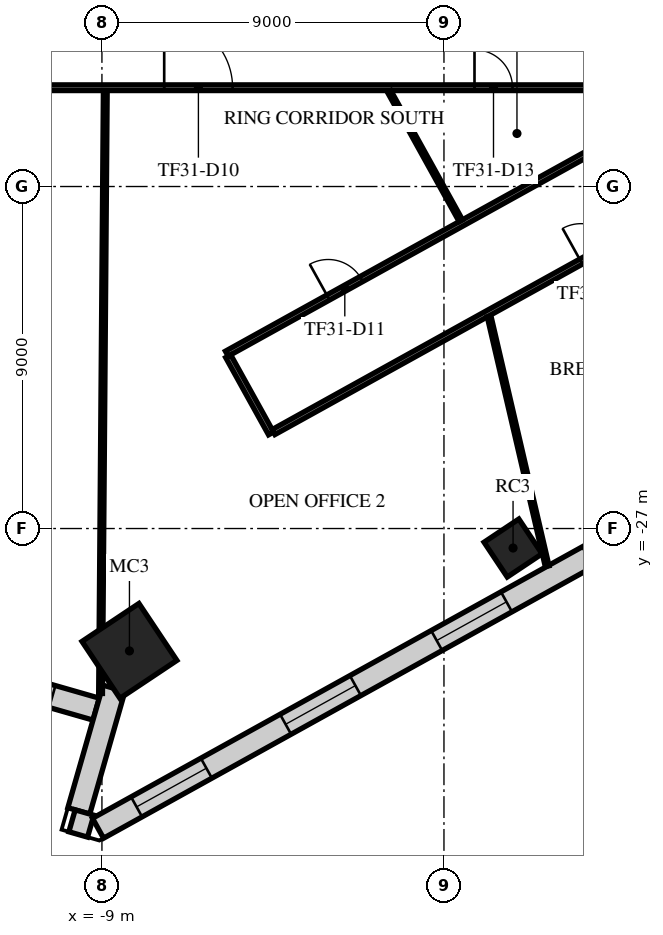
"""IFC4 building model, lengths in metres.
Left out: names, types, materials, properties, quantities, classifications, styles, units other than length and angle.
Written with IfcOpenShell. Run it as: python <this file> out.ifc"""

import sys

from ifc_helpers import new_model, si_unit, direction, frame, frame_2d, origin, origin_2d, place, context, subcontext, project, spatial, rectangle, extrude, element, fill, save


model = new_model("IFC4")
c1 = context("Model", 3, precision=1e-05, world=origin(), true_north=direction((0.0, 1.0)))
c2 = subcontext(c1, "Body", "Model", "MODEL_VIEW")
j1 = project(units=[si_unit("LENGTHUNIT", "METRE"), si_unit("PLANEANGLEUNIT", "RADIAN")], contexts=[c1])
p1 = place(None, origin())
s1 = spatial("IfcSite", under=j1, at=p1, CompositionType="ELEMENT")
p2 = place(p1, origin())
s2 = spatial("IfcBuilding", under=s1, at=p2, CompositionType="ELEMENT")
p3 = place(p2, frame((0.0, 0.0, 139.7)))
s3 = spatial("IfcBuildingStorey", under=s2, at=p3, CompositionType="ELEMENT", Elevation=139.7)
p4 = place(p3, frame((-8.276, -30.221, 0.0), z_axis=(0.0, 0.0, 1.0), x_axis=(0.832028680356, 0.55473261583, 0.0)))
e1 = element("IfcColumn", 1, at=p4, inside=s3, PredefinedType="COLUMN", context=c2, shape_type="SweptSolid", body=[
    extrude(rectangle(XDim=1.8, YDim=1.8, at=origin_2d()), origin(), (0.0, 0.0, 1.0), 4.0),
])
p5 = place(p3, frame((1.818, -27.513, 0.0), z_axis=(0.0, 0.0, 1.0), x_axis=(0.832028680356, 0.55473261583, 0.0)))
e2 = element("IfcColumn", 2, at=p5, inside=s3, PredefinedType="COLUMN", context=c2, shape_type="SweptSolid", body=[
    extrude(rectangle(XDim=1.1, YDim=1.1, at=origin_2d()), origin(), (0.0, 0.0, 1.0), 4.0),
])
p6 = place(p3, frame((-13.958, -30.375, 0.0), z_axis=(0.0, 0.0, 1.0), x_axis=(0.961260009649, -0.275643236537, 0.0)))
e3 = element("IfcWall", 3, at=p6, inside=s3, PredefinedType="STANDARD", context=c2, shape_type="SweptSolid", body=[
    extrude(rectangle(XDim=5.0, YDim=0.6, at=frame_2d((2.5, 0.0))), origin(), (0.0, 0.0, 1.0), 3.6),
])
p7 = place(p6, frame((1.2, 0.0, 0.9)))
e4 = element("IfcOpeningElement", 4, at=p7, cuts=e3, PredefinedType="OPENING", context=c2, shape_type="SweptSolid", body=[
    extrude(rectangle(XDim=2.6, YDim=2.1, at=frame_2d((1.3, 1.05))), frame((0.0, 0.31, 0.0), z_axis=(0.0, -1.0, 0.0), x_axis=(1.0, 0.0, 0.0)), (0.0, 0.0, 1.0), 0.62),
])
p8 = place(p3, frame((-8.683, -31.205, 0.0), z_axis=(0.0, 0.0, 1.0), x_axis=(-0.275672311862, -0.961251671766, 0.0)))
e5 = element("IfcWall", 5, at=p8, inside=s3, PredefinedType="STANDARD", context=c2, shape_type="SweptSolid", body=[
    extrude(rectangle(XDim=3.356, YDim=0.6, at=frame_2d((1.678, 0.0))), origin(), (0.0, 0.0, 1.0), 3.6),
])
p9 = place(p3, frame((-9.787, -34.691, 0.0), z_axis=(0.0, 0.0, 1.0), x_axis=(0.96119910246, -0.275855551749, 0.0)))
e6 = element("IfcWall", 6, at=p9, inside=s3, PredefinedType="STANDARD", context=c2, shape_type="SweptSolid", body=[
    extrude(rectangle(XDim=0.511, YDim=0.6, at=frame_2d((0.256, 0.0))), origin(), (0.0, 0.0, 1.0), 3.6),
])
p10 = place(p3, frame((-9.103, -34.888, 0.0), z_axis=(0.0, 0.0, 1.0), x_axis=(0.874618897425, 0.484811081007, 0.0)))
e7 = element("IfcWall", 7, at=p10, inside=s3, PredefinedType="STANDARD", context=c2, shape_type="SweptSolid", body=[
    extrude(rectangle(XDim=49.751, YDim=0.6, at=frame_2d((24.876, 0.0))), origin(), (0.0, 0.0, 1.0), 3.6),
])
p11 = place(p10, frame((1.161, 0.0, 0.9)))
e8 = element("IfcOpeningElement", 8, at=p11, cuts=e7, PredefinedType="OPENING", context=c2, shape_type="SweptSolid", body=[
    extrude(rectangle(XDim=2.1, YDim=2.1, at=frame_2d((1.05, 1.05))), frame((0.0, 0.31, 0.0), z_axis=(0.0, -1.0, 0.0), x_axis=(1.0, 0.0, 0.0)), (0.0, 0.0, 1.0), 0.62),
])
p12 = place(p10, frame((5.644, 0.0, 0.9)))
e9 = element("IfcOpeningElement", 9, at=p12, cuts=e7, PredefinedType="OPENING", context=c2, shape_type="SweptSolid", body=[
    extrude(rectangle(XDim=2.1, YDim=2.1, at=frame_2d((1.05, 1.05))), frame((0.0, 0.31, 0.0), z_axis=(0.0, -1.0, 0.0), x_axis=(1.0, 0.0, 0.0)), (0.0, 0.0, 1.0), 0.62),
])
p13 = place(p10, frame((10.189, 0.0, 0.9)))
e10 = element("IfcOpeningElement", 10, at=p13, cuts=e7, PredefinedType="OPENING", context=c2, shape_type="SweptSolid", body=[
    extrude(rectangle(XDim=2.1, YDim=2.1, at=frame_2d((1.05, 1.05))), frame((0.0, 0.31, 0.0), z_axis=(0.0, -1.0, 0.0), x_axis=(1.0, 0.0, 0.0)), (0.0, 0.0, 1.0), 0.62),
])
p14 = place(p10, frame((14.735, 0.0, 0.9)))
e11 = element("IfcOpeningElement", 11, at=p14, cuts=e7, PredefinedType="OPENING", context=c2, shape_type="SweptSolid", body=[
    extrude(rectangle(XDim=2.1, YDim=2.1, at=frame_2d((1.05, 1.05))), frame((0.0, 0.31, 0.0), z_axis=(0.0, -1.0, 0.0), x_axis=(1.0, 0.0, 0.0)), (0.0, 0.0, 1.0), 0.62),
])
p15 = place(p10, frame((19.28, 0.0, 0.9)))
e12 = element("IfcOpeningElement", 12, at=p15, cuts=e7, PredefinedType="OPENING", context=c2, shape_type="SweptSolid", body=[
    extrude(rectangle(XDim=2.1, YDim=2.1, at=frame_2d((1.05, 1.05))), frame((0.0, 0.31, 0.0), z_axis=(0.0, -1.0, 0.0), x_axis=(1.0, 0.0, 0.0)), (0.0, 0.0, 1.0), 0.62),
])
p16 = place(p10, frame((23.826, 0.0, 0.9)))
e13 = element("IfcOpeningElement", 13, at=p16, cuts=e7, PredefinedType="OPENING", context=c2, shape_type="SweptSolid", body=[
    extrude(rectangle(XDim=2.1, YDim=2.1, at=frame_2d((1.05, 1.05))), frame((0.0, 0.31, 0.0), z_axis=(0.0, -1.0, 0.0), x_axis=(1.0, 0.0, 0.0)), (0.0, 0.0, 1.0), 0.62),
])
p17 = place(p10, frame((28.371, 0.0, 0.9)))
e14 = element("IfcOpeningElement", 14, at=p17, cuts=e7, PredefinedType="OPENING", context=c2, shape_type="SweptSolid", body=[
    extrude(rectangle(XDim=2.1, YDim=2.1, at=frame_2d((1.05, 1.05))), frame((0.0, 0.31, 0.0), z_axis=(0.0, -1.0, 0.0), x_axis=(1.0, 0.0, 0.0)), (0.0, 0.0, 1.0), 0.62),
])
p18 = place(p10, frame((32.917, 0.0, 0.9)))
e15 = element("IfcOpeningElement", 15, at=p18, cuts=e7, PredefinedType="OPENING", context=c2, shape_type="SweptSolid", body=[
    extrude(rectangle(XDim=2.1, YDim=2.1, at=frame_2d((1.05, 1.05))), frame((0.0, 0.31, 0.0), z_axis=(0.0, -1.0, 0.0), x_axis=(1.0, 0.0, 0.0)), (0.0, 0.0, 1.0), 0.62),
])
p19 = place(p10, frame((37.462, 0.0, 0.9)))
e16 = element("IfcOpeningElement", 16, at=p19, cuts=e7, PredefinedType="OPENING", context=c2, shape_type="SweptSolid", body=[
    extrude(rectangle(XDim=2.1, YDim=2.1, at=frame_2d((1.05, 1.05))), frame((0.0, 0.31, 0.0), z_axis=(0.0, -1.0, 0.0), x_axis=(1.0, 0.0, 0.0)), (0.0, 0.0, 1.0), 0.62),
])
p20 = place(p10, frame((42.008, 0.0, 0.9)))
e17 = element("IfcOpeningElement", 17, at=p20, cuts=e7, PredefinedType="OPENING", context=c2, shape_type="SweptSolid", body=[
    extrude(rectangle(XDim=2.1, YDim=2.1, at=frame_2d((1.05, 1.05))), frame((0.0, 0.31, 0.0), z_axis=(0.0, -1.0, 0.0), x_axis=(1.0, 0.0, 0.0)), (0.0, 0.0, 1.0), 0.62),
])
p21 = place(p10, frame((46.491, 0.0, 0.9)))
e18 = element("IfcOpeningElement", 18, at=p21, cuts=e7, PredefinedType="OPENING", context=c2, shape_type="SweptSolid", body=[
    extrude(rectangle(XDim=2.1, YDim=2.1, at=frame_2d((1.05, 1.05))), frame((0.0, 0.31, 0.0), z_axis=(0.0, -1.0, 0.0), x_axis=(1.0, 0.0, 0.0)), (0.0, 0.0, 1.0), 0.62),
])
p22 = place(p3, frame((-14.684, -15.4, 0.0), z_axis=(0.0, 0.0, 1.0), x_axis=(1.0, 0.0, 0.0)))
e19 = element("IfcWall", 19, at=p22, inside=s3, PredefinedType="PARTITIONING", context=c2, shape_type="SweptSolid", body=[
    extrude(rectangle(XDim=21.596, YDim=0.15, at=frame_2d((10.798, 0.0))), origin(), (0.0, 0.0, 1.0), 3.15),
])
p23 = place(p22, frame((7.322, 0.0, 0.0)))
e20 = element("IfcOpeningElement", 20, at=p23, cuts=e19, PredefinedType="OPENING", context=c2, shape_type="SweptSolid", body=[
    extrude(rectangle(XDim=1.8, YDim=2.1, at=frame_2d((0.9, 1.05))), frame((0.0, 0.085, 0.0), z_axis=(0.0, -1.0, 0.0), x_axis=(1.0, 0.0, 0.0)), (0.0, 0.0, 1.0), 0.17),
])
p24 = place(p22, frame((15.487, 0.0, 0.0)))
e21 = element("IfcOpeningElement", 21, at=p24, cuts=e19, PredefinedType="OPENING", context=c2, shape_type="SweptSolid", body=[
    extrude(rectangle(XDim=1.0, YDim=2.1, at=frame_2d((0.5, 1.05))), frame((0.0, 0.085, 0.0), z_axis=(0.0, -1.0, 0.0), x_axis=(1.0, 0.0, 0.0)), (0.0, 0.0, 1.0), 0.17),
])
p25 = place(p3, frame((-5.714, -22.399, 0.0), z_axis=(0.0, 0.0, 1.0), x_axis=(0.874614395079, 0.484819203334, 0.0)))
e22 = element("IfcWall", 22, at=p25, inside=s3, PredefinedType="PARTITIONING", context=c2, shape_type="SweptSolid", body=[
    extrude(rectangle(XDim=14.146, YDim=0.15, at=frame_2d((7.073, 0.0))), origin(), (0.0, 0.0, 1.0), 3.15),
])
p26 = place(p25, frame((3.05, 0.0, 0.0)))
e23 = element("IfcOpeningElement", 23, at=p26, cuts=e22, PredefinedType="OPENING", context=c2, shape_type="SweptSolid", body=[
    extrude(rectangle(XDim=1.0, YDim=2.1, at=frame_2d((0.5, 1.05))), frame((0.0, 0.085, 0.0), z_axis=(0.0, -1.0, 0.0), x_axis=(1.0, 0.0, 0.0)), (0.0, 0.0, 1.0), 0.17),
])
p27 = place(p3, frame((-5.677, -22.465, 0.0), z_axis=(0.0, 0.0, 1.0), x_axis=(0.484902784843, -0.874568058673, 0.0)))
e24 = element("IfcWall", 24, at=p27, inside=s3, PredefinedType="PARTITIONING", context=c2, shape_type="SweptSolid", body=[
    extrude(rectangle(XDim=2.325, YDim=0.15, at=frame_2d((1.163, 0.0))), origin(), (0.0, 0.0, 1.0), 3.6),
])
p28 = place(p3, frame((-4.484, -24.462, 0.0), z_axis=(0.0, 0.0, 1.0), x_axis=(0.874618059696, 0.484812592301, 0.0)))
e25 = element("IfcWall", 25, at=p28, inside=s3, PredefinedType="PARTITIONING", context=c2, shape_type="SweptSolid", body=[
    extrude(rectangle(XDim=31.638, YDim=0.15, at=frame_2d((15.819, 0.0))), origin(), (0.0, 0.0, 1.0), 3.15),
])
p29 = place(p28, frame((9.25, 0.0, 0.0)))
e26 = element("IfcOpeningElement", 26, at=p29, cuts=e25, PredefinedType="OPENING", context=c2, shape_type="SweptSolid", body=[
    extrude(rectangle(XDim=1.0, YDim=2.1, at=frame_2d((0.5, 1.05))), frame((0.0, 0.085, 0.0), z_axis=(0.0, -1.0, 0.0), x_axis=(1.0, 0.0, 0.0)), (0.0, 0.0, 1.0), 0.17),
])
p30 = place(p28, frame((19.239, 0.0, 0.0)))
e27 = element("IfcOpeningElement", 27, at=p30, cuts=e25, PredefinedType="OPENING", context=c2, shape_type="SweptSolid", body=[
    extrude(rectangle(XDim=1.0, YDim=2.1, at=frame_2d((0.5, 1.05))), frame((0.0, 0.085, 0.0), z_axis=(0.0, -1.0, 0.0), x_axis=(1.0, 0.0, 0.0)), (0.0, 0.0, 1.0), 0.17),
])
p31 = place(p28, frame((24.772, 0.0, 0.0)))
e28 = element("IfcOpeningElement", 28, at=p31, cuts=e25, PredefinedType="OPENING", context=c2, shape_type="SweptSolid", body=[
    extrude(rectangle(XDim=1.0, YDim=2.1, at=frame_2d((0.5, 1.05))), frame((0.0, 0.085, 0.0), z_axis=(0.0, -1.0, 0.0), x_axis=(1.0, 0.0, 0.0)), (0.0, 0.0, 1.0), 0.17),
])
p32 = place(p3, frame((-9.036, -31.34, 0.0), z_axis=(0.0, 0.0, 1.0), x_axis=(0.008145579251, 0.999966824219, 0.0)))
e29 = element("IfcWall", 29, at=p32, inside=s3, PredefinedType="PARTITIONING", context=c2, shape_type="SweptSolid", body=[
    extrude(rectangle(XDim=0.629, YDim=0.1, at=frame_2d((0.315, 0.0))), origin(), (0.0, 0.0, 1.0), 3.6),
])
p33 = place(p3, frame((-9.023, -29.637, 0.0), z_axis=(0.0, 0.0, 1.0), x_axis=(0.007843639619, 0.999969238186, 0.0)))
e30 = element("IfcWall", 30, at=p33, inside=s3, PredefinedType="PARTITIONING", context=c2, shape_type="SweptSolid", body=[
    extrude(rectangle(XDim=14.162, YDim=0.1, at=frame_2d((7.081, 0.0))), origin(), (0.0, 0.0, 1.0), 3.15),
])
p34 = place(p3, frame((-1.441, -15.499, 0.0), z_axis=(0.0, 0.0, 1.0), x_axis=(0.484661708709, -0.874701679495, 0.0)))
e31 = element("IfcWall", 31, at=p34, inside=s3, PredefinedType="PARTITIONING", context=c2, shape_type="SweptSolid", body=[
    extrude(rectangle(XDim=3.888, YDim=0.1, at=frame_2d((1.944, 0.0))), origin(), (0.0, 0.0, 1.0), 3.6),
])
p35 = place(p3, frame((1.188, -21.419, 0.0), z_axis=(0.0, 0.0, 1.0), x_axis=(0.226360220424, -0.974043659499, 0.0)))
e32 = element("IfcWall", 32, at=p35, inside=s3, PredefinedType="PARTITIONING", context=c2, shape_type="SweptSolid", body=[
    extrude(rectangle(XDim=6.747, YDim=0.1, at=frame_2d((3.374, 0.0))), origin(), (0.0, 0.0, 1.0), 3.03),
])
p36 = place(p7, origin())
e33 = element("IfcWindow", 33, at=p36, inside=s3, PartitioningType="SINGLE_PANEL", PredefinedType="WINDOW", context=c2, shape_type="SweptSolid", body=[
    extrude(rectangle(XDim=2.6, YDim=2.1, at=frame_2d((1.3, 1.05))), frame((0.0, 0.03, 0.0), z_axis=(0.0, -1.0, 0.0), x_axis=(1.0, 0.0, 0.0)), (0.0, 0.0, 1.0), 0.06),
])
fill(e4, e33)
p37 = place(p11, origin())
e34 = element("IfcWindow", 34, at=p37, inside=s3, PartitioningType="SINGLE_PANEL", PredefinedType="WINDOW", context=c2, shape_type="SweptSolid", body=[
    extrude(rectangle(XDim=2.1, YDim=2.1, at=frame_2d((1.05, 1.05))), frame((0.0, 0.03, 0.0), z_axis=(0.0, -1.0, 0.0), x_axis=(1.0, 0.0, 0.0)), (0.0, 0.0, 1.0), 0.06),
])
fill(e8, e34)
p38 = place(p12, origin())
e35 = element("IfcWindow", 35, at=p38, inside=s3, PartitioningType="SINGLE_PANEL", PredefinedType="WINDOW", context=c2, shape_type="SweptSolid", body=[
    extrude(rectangle(XDim=2.1, YDim=2.1, at=frame_2d((1.05, 1.05))), frame((0.0, 0.03, 0.0), z_axis=(0.0, -1.0, 0.0), x_axis=(1.0, 0.0, 0.0)), (0.0, 0.0, 1.0), 0.06),
])
fill(e9, e35)
p39 = place(p13, origin())
e36 = element("IfcWindow", 36, at=p39, inside=s3, PartitioningType="SINGLE_PANEL", PredefinedType="WINDOW", context=c2, shape_type="SweptSolid", body=[
    extrude(rectangle(XDim=2.1, YDim=2.1, at=frame_2d((1.05, 1.05))), frame((0.0, 0.03, 0.0), z_axis=(0.0, -1.0, 0.0), x_axis=(1.0, 0.0, 0.0)), (0.0, 0.0, 1.0), 0.06),
])
fill(e10, e36)
p40 = place(p23, frame((1.8, 0.0, 0.0), z_axis=(0.0, 0.0, 1.0), x_axis=(-1.0, 0.0, 0.0)))
e37 = element("IfcDoor", 37, at=p40, inside=s3, OperationType="DOUBLE_DOOR_SINGLE_SWING", PredefinedType="DOOR", context=c2, shape_type="SweptSolid", body=[
    extrude(rectangle(XDim=1.8, YDim=2.1, at=frame_2d((0.9, 1.05))), frame((0.0, 0.025, 0.0), z_axis=(0.0, -1.0, 0.0), x_axis=(1.0, 0.0, 0.0)), (0.0, 0.0, 1.0), 0.05),
])
fill(e20, e37)
p41 = place(p26, origin())
e38 = element("IfcDoor", 38, at=p41, inside=s3, OperationType="SINGLE_SWING_LEFT", PredefinedType="DOOR", context=c2, shape_type="SweptSolid", body=[
    extrude(rectangle(XDim=1.0, YDim=2.1, at=frame_2d((0.5, 1.05))), frame((0.0, 0.025, 0.0), z_axis=(0.0, -1.0, 0.0), x_axis=(1.0, 0.0, 0.0)), (0.0, 0.0, 1.0), 0.05),
])
fill(e23, e38)
p42 = place(p24, frame((1.0, 0.0, 0.0), z_axis=(0.0, 0.0, 1.0), x_axis=(-1.0, 0.0, 0.0)))
e39 = element("IfcDoor", 39, at=p42, inside=s3, OperationType="SINGLE_SWING_LEFT", PredefinedType="DOOR", context=c2, shape_type="SweptSolid", body=[
    extrude(rectangle(XDim=1.0, YDim=2.1, at=frame_2d((0.5, 1.05))), frame((0.0, 0.025, 0.0), z_axis=(0.0, -1.0, 0.0), x_axis=(1.0, 0.0, 0.0)), (0.0, 0.0, 1.0), 0.05),
])
fill(e21, e39)
p43 = place(p29, frame((1.0, 0.0, 0.0), z_axis=(0.0, 0.0, 1.0), x_axis=(-1.0, 0.0, 0.0)))
e40 = element("IfcDoor", 40, at=p43, inside=s3, OperationType="SINGLE_SWING_RIGHT", PredefinedType="DOOR", context=c2, shape_type="SweptSolid", body=[
    extrude(rectangle(XDim=1.0, YDim=2.1, at=frame_2d((0.5, 1.05))), frame((0.0, 0.025, 0.0), z_axis=(0.0, -1.0, 0.0), x_axis=(1.0, 0.0, 0.0)), (0.0, 0.0, 1.0), 0.05),
])
fill(e26, e40)
save(model, sys.argv[1])
